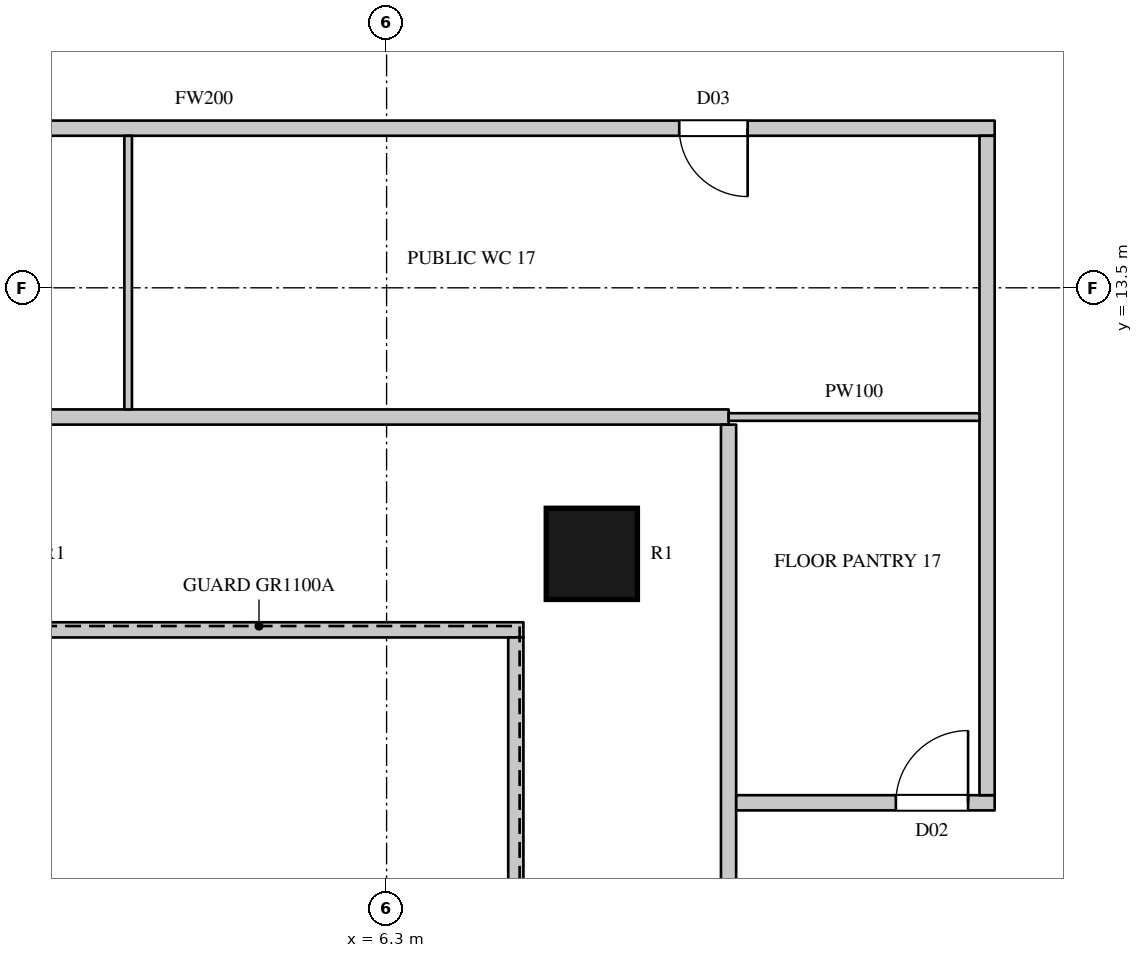
"""IFC4 building model, lengths in metres.
Left out: names, types, materials, properties, quantities, classifications, styles, units other than length and angle.
Written with IfcOpenShell. Run it as: python <this file> out.ifc"""

import sys

from ifc_helpers import new_model, si_unit, direction, frame, frame_2d, origin, origin_2d, place, context, subcontext, project, spatial, rectangle, circle, extrude, element, fill, save


model = new_model("IFC4")
c1 = context("Model", 3, precision=1e-05, world=origin(), true_north=direction((0.0, 1.0)))
c2 = subcontext(c1, "Body", "Model", "MODEL_VIEW")
j1 = project(units=[si_unit("LENGTHUNIT", "METRE"), si_unit("PLANEANGLEUNIT", "RADIAN")], contexts=[c1])
p1 = place(None, origin())
s1 = spatial("IfcSite", under=j1, at=p1, CompositionType="ELEMENT")
p2 = place(p1, origin())
s2 = spatial("IfcBuilding", under=s1, at=p2, CompositionType="ELEMENT")
p3 = place(p2, frame((0.0, 0.0, 91.5)))
s3 = spatial("IfcBuildingStorey", under=s2, at=p3, CompositionType="ELEMENT", Elevation=91.5)
p4 = place(p3, frame((9.0, 10.0, 0.0), z_axis=(0.0, 0.0, 1.0), x_axis=(1.0, 0.0, 0.0)))
e1 = element("IfcColumn", 1, at=p4, inside=s3, PredefinedType="COLUMN", context=c2, shape_type="SweptSolid", body=[
    extrude(circle(Radius=0.6, at=origin_2d()), origin(), (0.0, 0.0, 1.0), 3.6),
])
p5 = place(p3, frame((-8.9, 11.8, 0.0), z_axis=(0.0, 0.0, 1.0), x_axis=(1.0, 0.0, 0.0)))
e2 = element("IfcWall", 2, at=p5, inside=s3, PredefinedType="PARTITIONING", context=c2, shape_type="SweptSolid", body=[
    extrude(rectangle(XDim=19.7, YDim=0.2, at=frame_2d((9.85, 0.0))), origin(), (0.0, 0.0, 1.0), 3.3),
])
p6 = place(p5, frame((0.8, 0.0, 0.0)))
e3 = element("IfcOpeningElement", 3, at=p6, cuts=e2, PredefinedType="OPENING", context=c2, shape_type="SweptSolid", body=[
    extrude(rectangle(XDim=1.5, YDim=2.2, at=frame_2d((0.75, 1.1))), frame((0.0, 0.11, 0.0), z_axis=(0.0, -1.0, 0.0), x_axis=(1.0, 0.0, 0.0)), (0.0, 0.0, 1.0), 0.22),
])
p7 = place(p3, frame((-6.5, 15.6, 0.0), z_axis=(0.0, 0.0, 1.0), x_axis=(1.0, 0.0, 0.0)))
e4 = element("IfcWall", 4, at=p7, inside=s3, PredefinedType="PARTITIONING", context=c2, shape_type="SweptSolid", body=[
    extrude(rectangle(XDim=20.8, YDim=0.2, at=frame_2d((10.4, 0.0))), origin(), (0.0, 0.0, 1.0), 3.3),
])
p8 = place(p7, frame((6.5, 0.0, 0.0)))
e5 = element("IfcOpeningElement", 5, at=p8, cuts=e4, PredefinedType="OPENING", context=c2, shape_type="SweptSolid", body=[
    extrude(rectangle(XDim=0.9, YDim=2.2, at=frame_2d((0.45, 1.1))), frame((0.0, 0.11, 0.0), z_axis=(0.0, -1.0, 0.0), x_axis=(1.0, 0.0, 0.0)), (0.0, 0.0, 1.0), 0.22),
])
p9 = place(p7, frame((16.65, 0.0, 0.0)))
e6 = element("IfcOpeningElement", 6, at=p9, cuts=e4, PredefinedType="OPENING", context=c2, shape_type="SweptSolid", body=[
    extrude(rectangle(XDim=0.9, YDim=2.2, at=frame_2d((0.45, 1.1))), frame((0.0, 0.11, 0.0), z_axis=(0.0, -1.0, 0.0), x_axis=(1.0, 0.0, 0.0)), (0.0, 0.0, 1.0), 0.22),
])
p10 = place(p3, frame((-6.1, 9.0, 0.0), z_axis=(0.0, 0.0, 1.0), x_axis=(1.0, 0.0, 0.0)))
e7 = element("IfcWall", 7, at=p10, inside=s3, PredefinedType="PARTITIONING", context=c2, shape_type="SweptSolid", body=[
    extrude(rectangle(XDim=14.2, YDim=0.2, at=frame_2d((7.1, 0.0))), origin(), (0.0, 0.0, 1.0), 3.3),
])
p11 = place(p3, frame((8.0, -8.9, 0.0), z_axis=(0.0, 0.0, 1.0), x_axis=(0.0, 1.0, 0.0)))
e8 = element("IfcWall", 8, at=p11, inside=s3, PredefinedType="PARTITIONING", context=c2, shape_type="SweptSolid", body=[
    extrude(rectangle(XDim=17.8, YDim=0.2, at=frame_2d((8.9, 0.0))), origin(), (0.0, 0.0, 1.0), 3.3),
])
p12 = place(p3, frame((10.799, -12.5, 0.0), z_axis=(0.0, 0.0, 1.0), x_axis=(0.0, 1.0, 0.0)))
e9 = element("IfcWall", 9, at=p12, inside=s3, PredefinedType="PARTITIONING", context=c2, shape_type="SweptSolid", body=[
    extrude(rectangle(XDim=24.2, YDim=0.2, at=frame_2d((12.1, 0.0))), origin(), (0.0, 0.0, 1.0), 3.3),
])
p13 = place(p12, frame((13.15, 0.0, 0.0)))
e10 = element("IfcOpeningElement", 10, at=p13, cuts=e9, PredefinedType="OPENING", context=c2, shape_type="SweptSolid", body=[
    extrude(rectangle(XDim=1.5, YDim=2.2, at=frame_2d((0.75, 1.1))), frame((0.0, 0.11, 0.0), z_axis=(0.0, -1.0, 0.0), x_axis=(1.0, 0.0, 0.0)), (0.0, 0.0, 1.0), 0.22),
])
p14 = place(p3, frame((10.9, 6.725, 0.0), z_axis=(0.0, 0.0, 1.0), x_axis=(1.0, 0.0, 0.0)))
e11 = element("IfcWall", 11, at=p14, inside=s3, PredefinedType="PARTITIONING", context=c2, shape_type="SweptSolid", body=[
    extrude(rectangle(XDim=3.4, YDim=0.2, at=frame_2d((1.7, 0.0))), origin(), (0.0, 0.0, 1.0), 3.3),
])
p15 = place(p14, frame((2.1, 0.0, 0.0)))
e12 = element("IfcOpeningElement", 12, at=p15, cuts=e11, PredefinedType="OPENING", context=c2, shape_type="SweptSolid", body=[
    extrude(rectangle(XDim=0.95, YDim=2.2, at=frame_2d((0.475, 1.1))), frame((0.0, 0.11, 0.0), z_axis=(0.0, -1.0, 0.0), x_axis=(1.0, 0.0, 0.0)), (0.0, 0.0, 1.0), 0.22),
])
p16 = place(p3, frame((14.2, 6.825, 0.0), z_axis=(0.0, 0.0, 1.0), x_axis=(0.0, 1.0, 0.0)))
e13 = element("IfcWall", 13, at=p16, inside=s3, PredefinedType="PARTITIONING", context=c2, shape_type="SweptSolid", body=[
    extrude(rectangle(XDim=8.675, YDim=0.2, at=frame_2d((4.337, 0.0))), origin(), (0.0, 0.0, 1.0), 3.3),
])
p17 = place(p3, frame((2.9, 11.9, 0.0), z_axis=(0.0, 0.0, 1.0), x_axis=(0.0, 1.0, 0.0)))
e14 = element("IfcWall", 14, at=p17, inside=s3, PredefinedType="PARTITIONING", context=c2, shape_type="SweptSolid", body=[
    extrude(rectangle(XDim=3.6, YDim=0.1, at=frame_2d((1.8, 0.0))), origin(), (0.0, 0.0, 1.0), 3.3),
])
p18 = place(p3, frame((10.8, 11.8, 0.0), z_axis=(0.0, 0.0, 1.0), x_axis=(1.0, 0.0, 0.0)))
e15 = element("IfcWall", 15, at=p18, inside=s3, PredefinedType="PARTITIONING", context=c2, shape_type="SweptSolid", body=[
    extrude(rectangle(XDim=3.3, YDim=0.1, at=frame_2d((1.65, 0.0))), origin(), (0.0, 0.0, 1.0), 3.3),
])
p19 = place(p9, origin())
e16 = element("IfcDoor", 16, at=p19, inside=s3, OperationType="SINGLE_SWING_LEFT", PredefinedType="DOOR", context=c2, shape_type="SweptSolid", body=[
    extrude(rectangle(XDim=0.9, YDim=2.2, at=frame_2d((0.45, 1.1))), frame((0.0, 0.025, 0.0), z_axis=(0.0, -1.0, 0.0), x_axis=(1.0, 0.0, 0.0)), (0.0, 0.0, 1.0), 0.05),
])
fill(e6, e16)
p20 = place(p15, origin())
e17 = element("IfcDoor", 17, at=p20, inside=s3, OperationType="SINGLE_SWING_RIGHT", PredefinedType="DOOR", context=c2, shape_type="SweptSolid", body=[
    extrude(rectangle(XDim=0.95, YDim=2.2, at=frame_2d((0.475, 1.1))), frame((0.0, 0.025, 0.0), z_axis=(0.0, -1.0, 0.0), x_axis=(1.0, 0.0, 0.0)), (0.0, 0.0, 1.0), 0.05),
])
fill(e12, e17)
save(model, sys.argv[1])
